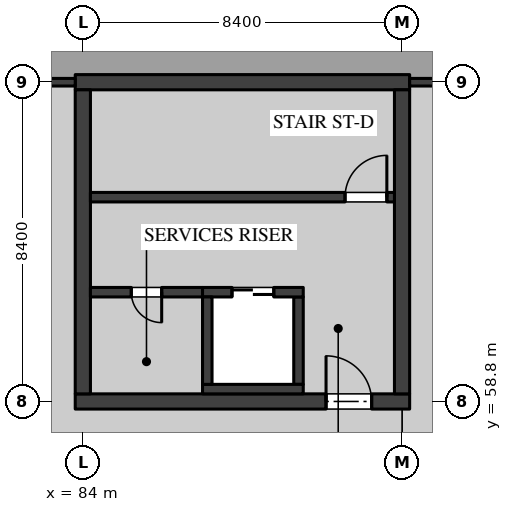
"""IFC4 building model, lengths in metres.
Left out: names, types, materials, properties, quantities, classifications, styles, units other than length and angle.
Written with IfcOpenShell. Run it as: python <this file> out.ifc"""

import sys

from ifc_helpers import new_model, si_unit, direction, frame, frame_2d, origin, place, context, subcontext, project, spatial, rectangle, extrude, element, fill, save


model = new_model("IFC4")
c1 = context("Model", 3, precision=1e-05, world=origin(), true_north=direction((0.0, 1.0)))
c2 = subcontext(c1, "Body", "Model", "MODEL_VIEW")
j1 = project(units=[si_unit("LENGTHUNIT", "METRE"), si_unit("PLANEANGLEUNIT", "RADIAN")], contexts=[c1])
p1 = place(None, origin())
s1 = spatial("IfcSite", under=j1, at=p1, CompositionType="ELEMENT")
p2 = place(p1, origin())
s2 = spatial("IfcBuilding", under=s1, at=p2, CompositionType="ELEMENT")
p3 = place(p2, frame((0.0, 0.0, -4.5)))
s3 = spatial("IfcBuildingStorey", under=s2, at=p3, CompositionType="ELEMENT", Elevation=-4.5)
p4 = place(p3, frame((83.8, 58.8, 0.0), z_axis=(0.0, 0.0, 1.0), x_axis=(1.0, 0.0, 0.0)))
e1 = element("IfcWall", 1, at=p4, inside=s3, PredefinedType="SHEAR", context=c2, shape_type="SweptSolid", body=[
    extrude(rectangle(XDim=8.8, YDim=0.4, at=frame_2d((4.4, 0.0))), origin(), (0.0, 0.0, 1.0), 4.05),
])
p5 = place(p4, frame((6.6, 0.0, 0.0)))
e2 = element("IfcOpeningElement", 2, at=p5, cuts=e1, PredefinedType="OPENING", context=c2, shape_type="SweptSolid", body=[
    extrude(rectangle(XDim=1.2, YDim=2.1, at=frame_2d((0.6, 1.05))), frame((0.0, 0.21, 0.0), z_axis=(0.0, -1.0, 0.0), x_axis=(1.0, 0.0, 0.0)), (0.0, 0.0, 1.0), 0.42),
])
p6 = place(p3, frame((83.8, 67.2, 0.0), z_axis=(0.0, 0.0, 1.0), x_axis=(1.0, 0.0, 0.0)))
e3 = element("IfcWall", 3, at=p6, inside=s3, PredefinedType="SHEAR", context=c2, shape_type="SweptSolid", body=[
    extrude(rectangle(XDim=8.8, YDim=0.4, at=frame_2d((4.4, 0.0))), origin(), (0.0, 0.0, 1.0), 4.05),
])
for number, where, z_axis, x_axis in (
    (4, (84.0, 59.0, 0.0), (0.0, 0.0, 1.0), (0.0, 1.0, 0.0)),
    (5, (92.4, 59.0, 0.0), (0.0, 0.0, 1.0), (0.0, 1.0, 0.0)),
):
    element("IfcWall", number, at=place(p3, frame(where, z_axis=z_axis, x_axis=x_axis)), inside=s3, PredefinedType="SHEAR", context=c2, shape_type="SweptSolid", body=[
        extrude(rectangle(XDim=8.0, YDim=0.4, at=frame_2d((4.0, 0.0))), origin(), (0.0, 0.0, 1.0), 4.05),
    ])
p7 = place(p3, frame((92.2, 64.175, 0.0), z_axis=(0.0, 0.0, 1.0), x_axis=(-1.0, 0.0, 0.0)))
e6 = element("IfcWall", 6, at=p7, inside=s3, PredefinedType="SOLIDWALL", context=c2, shape_type="SweptSolid", body=[
    extrude(rectangle(XDim=8.0, YDim=0.25, at=frame_2d((4.0, 0.0))), origin(), (0.0, 0.0, 1.0), 4.05),
])
p8 = place(p7, frame((0.2, 0.0, 0.0)))
e7 = element("IfcOpeningElement", 7, at=p8, cuts=e6, PredefinedType="OPENING", context=c2, shape_type="SweptSolid", body=[
    extrude(rectangle(XDim=1.1, YDim=2.1, at=frame_2d((0.55, 1.05))), frame((0.0, 0.135, 0.0), z_axis=(0.0, -1.0, 0.0), x_axis=(1.0, 0.0, 0.0)), (0.0, 0.0, 1.0), 0.27),
])
p9 = place(p3, frame((87.15, 61.675, 0.0), z_axis=(0.0, 0.0, 1.0), x_axis=(-1.0, 0.0, 0.0)))
e8 = element("IfcWall", 8, at=p9, inside=s3, PredefinedType="SOLIDWALL", context=c2, shape_type="SweptSolid", body=[
    extrude(rectangle(XDim=2.95, YDim=0.25, at=frame_2d((1.475, 0.0))), origin(), (0.0, 0.0, 1.0), 4.05),
])
p10 = place(p9, frame((1.075, 0.0, 0.0)))
e9 = element("IfcOpeningElement", 9, at=p10, cuts=e8, PredefinedType="OPENING", context=c2, shape_type="SweptSolid", body=[
    extrude(rectangle(XDim=0.8, YDim=2.1, at=frame_2d((0.4, 1.05))), frame((0.0, 0.135, 0.0), z_axis=(0.0, -1.0, 0.0), x_axis=(1.0, 0.0, 0.0)), (0.0, 0.0, 1.0), 0.27),
])
p11 = place(p3, frame((89.675, 59.25, 0.0), z_axis=(0.0, 0.0, 1.0), x_axis=(0.0, 1.0, 0.0)))
e10 = element("IfcWall", 10, at=p11, inside=s3, PredefinedType="SOLIDWALL", context=c2, shape_type="SweptSolid", body=[
    extrude(rectangle(XDim=2.3, YDim=0.25, at=frame_2d((1.15, 0.0))), origin(), (0.0, 0.0, 1.0), 4.05),
])
p12 = place(p3, frame((87.15, 61.675, 0.0), z_axis=(0.0, 0.0, 1.0), x_axis=(1.0, 0.0, 0.0)))
e11 = element("IfcWall", 11, at=p12, inside=s3, PredefinedType="SOLIDWALL", context=c2, shape_type="SweptSolid", body=[
    extrude(rectangle(XDim=2.65, YDim=0.25, at=frame_2d((1.325, 0.0))), origin(), (0.0, 0.0, 1.0), 4.05),
])
p13 = place(p12, frame((0.775, 0.0, 0.0)))
e12 = element("IfcOpeningElement", 12, at=p13, cuts=e11, PredefinedType="OPENING", context=c2, shape_type="SweptSolid", body=[
    extrude(rectangle(XDim=1.1, YDim=2.1, at=frame_2d((0.55, 1.05))), frame((0.0, 0.135, 0.0), z_axis=(0.0, -1.0, 0.0), x_axis=(1.0, 0.0, 0.0)), (0.0, 0.0, 1.0), 0.27),
])
p14 = place(p3, frame((87.15, 59.125, 0.0), z_axis=(0.0, 0.0, 1.0), x_axis=(1.0, 0.0, 0.0)))
e13 = element("IfcWall", 13, at=p14, inside=s3, PredefinedType="SOLIDWALL", context=c2, shape_type="SweptSolid", body=[
    extrude(rectangle(XDim=2.65, YDim=0.25, at=frame_2d((1.325, 0.0))), origin(), (0.0, 0.0, 1.0), 4.05),
])
p15 = place(p3, frame((87.275, 59.25, 0.0), z_axis=(0.0, 0.0, 1.0), x_axis=(0.0, 1.0, 0.0)))
e14 = element("IfcWall", 14, at=p15, inside=s3, PredefinedType="SOLIDWALL", context=c2, shape_type="SweptSolid", body=[
    extrude(rectangle(XDim=2.3, YDim=0.25, at=frame_2d((1.15, 0.0))), origin(), (0.0, 0.0, 1.0), 4.05),
])
p16 = place(p3, frame((92.6, 67.2, 0.0), z_axis=(0.0, 0.0, 1.0), x_axis=(1.0, 0.0, 0.0)))
e15 = element("IfcWall", 15, at=p16, inside=s3, PredefinedType="PARTITIONING", context=c2, shape_type="SweptSolid", body=[
    extrude(rectangle(XDim=7.75, YDim=0.2, at=frame_2d((3.875, 0.0))), origin(), (0.0, 0.0, 1.0), 4.05),
])
p17 = place(p3, frame((76.0, 67.2, 0.0), z_axis=(0.0, 0.0, 1.0), x_axis=(1.0, 0.0, 0.0)))
e16 = element("IfcWall", 16, at=p17, inside=s3, PredefinedType="PARTITIONING", context=c2, shape_type="SweptSolid", body=[
    extrude(rectangle(XDim=7.8, YDim=0.2, at=frame_2d((3.9, 0.0))), origin(), (0.0, 0.0, 1.0), 4.05),
])
p18 = place(p17, frame((3.6, 0.0, 0.0)))
e17 = element("IfcOpeningElement", 17, at=p18, cuts=e16, PredefinedType="OPENING", context=c2, shape_type="SweptSolid", body=[
    extrude(rectangle(XDim=1.0, YDim=2.1, at=frame_2d((0.5, 1.05))), frame((0.0, 0.11, 0.0), z_axis=(0.0, -1.0, 0.0), x_axis=(1.0, 0.0, 0.0)), (0.0, 0.0, 1.0), 0.22),
])
p19 = place(p5, origin())
e18 = element("IfcDoor", 18, at=p19, inside=s3, OperationType="SINGLE_SWING_RIGHT", PredefinedType="DOOR", context=c2, shape_type="SweptSolid", body=[
    extrude(rectangle(XDim=1.2, YDim=2.1, at=frame_2d((0.6, 1.05))), frame((0.0, 0.035, 0.0), z_axis=(0.0, -1.0, 0.0), x_axis=(1.0, 0.0, 0.0)), (0.0, 0.0, 1.0), 0.07),
])
fill(e2, e18)
p20 = place(p10, origin())
e19 = element("IfcDoor", 19, at=p20, inside=s3, OperationType="SINGLE_SWING_RIGHT", PredefinedType="DOOR", context=c2, shape_type="SweptSolid", body=[
    extrude(rectangle(XDim=0.8, YDim=2.1, at=frame_2d((0.4, 1.05))), frame((0.0, 0.035, 0.0), z_axis=(0.0, -1.0, 0.0), x_axis=(1.0, 0.0, 0.0)), (0.0, 0.0, 1.0), 0.07),
])
fill(e9, e19)
p21 = place(p8, frame((1.1, 0.0, 0.0), z_axis=(0.0, 0.0, 1.0), x_axis=(-1.0, 0.0, 0.0)))
e20 = element("IfcDoor", 20, at=p21, inside=s3, OperationType="SINGLE_SWING_LEFT", PredefinedType="DOOR", context=c2, shape_type="SweptSolid", body=[
    extrude(rectangle(XDim=1.1, YDim=2.1, at=frame_2d((0.55, 1.05))), frame((0.0, 0.035, 0.0), z_axis=(0.0, -1.0, 0.0), x_axis=(1.0, 0.0, 0.0)), (0.0, 0.0, 1.0), 0.07),
])
fill(e7, e20)
p22 = place(p13, origin())
e21 = element("IfcDoor", 21, at=p22, inside=s3, OperationType="DOUBLE_DOOR_SLIDING", PredefinedType="DOOR", context=c2, shape_type="SweptSolid", body=[
    extrude(rectangle(XDim=1.1, YDim=2.1, at=frame_2d((0.55, 1.05))), frame((0.0, 0.04, 0.0), z_axis=(0.0, -1.0, 0.0), x_axis=(1.0, 0.0, 0.0)), (0.0, 0.0, 1.0), 0.08),
])
fill(e12, e21)
save(model, sys.argv[1])
